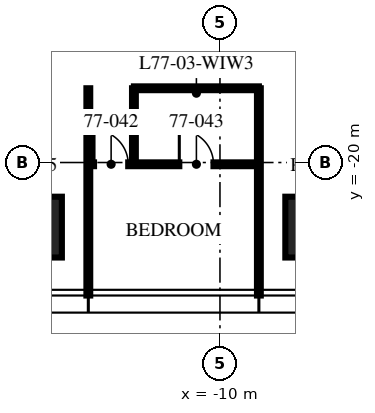
"""IFC4 building model, lengths in metres.
Left out: names, types, materials, properties, quantities, classifications, styles, units other than length and angle.
Written with IfcOpenShell. Run it as: python <this file> out.ifc"""

import sys

from ifc_helpers import new_model, si_unit, direction, frame, frame_2d, origin, origin_2d, place, context, subcontext, project, spatial, rectangle, extrude, element, fill, save


model = new_model("IFC4")
c1 = context("Model", 3, precision=1e-05, world=origin(), true_north=direction((0.0, 1.0)))
c2 = subcontext(c1, "Body", "Model", "MODEL_VIEW")
j1 = project(units=[si_unit("LENGTHUNIT", "METRE"), si_unit("PLANEANGLEUNIT", "RADIAN")], contexts=[c1])
p1 = place(None, origin())
s1 = spatial("IfcSite", under=j1, at=p1, CompositionType="ELEMENT")
p2 = place(p1, origin())
s2 = spatial("IfcBuilding", under=s1, at=p2, CompositionType="ELEMENT")
p3 = place(p2, frame((0.0, 0.0, 308.25)))
s3 = spatial("IfcBuildingStorey", under=s2, at=p3, CompositionType="ELEMENT", Elevation=308.25)
for number, where, z_axis, x_axis in (
    (1, (-7.48, -21.7, 0.0), (0.0, 0.0, 1.0), (1.0, 0.0, 0.0)),
    (2, (-14.96, -21.7, 0.0), (0.0, 0.0, 1.0), (1.0, 0.0, 0.0)),
):
    element("IfcColumn", number, at=place(p3, frame(where, z_axis=z_axis, x_axis=x_axis)), inside=s3, PredefinedType="COLUMN", context=c2, shape_type="SweptSolid", body=[
        extrude(rectangle(XDim=1.6, YDim=1.6, at=origin_2d()), origin(), (0.0, 0.0, 1.0), 3.75),
    ])
for number, where, z_axis, x_axis in (
    (3, (-13.464, -18.046, 0.0), (0.0, 0.0, 1.0), (0.0, -1.0, 0.0)),
    (4, (-8.976, -18.046, 0.0), (0.0, 0.0, 1.0), (0.0, -1.0, 0.0)),
):
    element("IfcWall", number, at=place(p3, frame(where, z_axis=z_axis, x_axis=x_axis)), inside=s3, PredefinedType="PARTITIONING", context=c2, shape_type="SweptSolid", body=[
        extrude(rectangle(XDim=5.454, YDim=0.1, at=frame_2d((2.727, 0.0))), origin(), (0.0, 0.0, 1.0), 3.01),
    ])
p4 = place(p3, frame((-13.464, -20.046, 0.0), z_axis=(0.0, 0.0, 1.0), x_axis=(1.0, 0.0, 0.0)))
e5 = element("IfcWall", 5, at=p4, inside=s3, PredefinedType="PARTITIONING", context=c2, shape_type="SweptSolid", body=[
    extrude(rectangle(XDim=4.488, YDim=0.1, at=frame_2d((2.244, 0.0))), origin(), (0.0, 0.0, 1.0), 2.91),
])
p5 = place(p4, frame((0.15, 0.0, 0.0)))
e6 = element("IfcOpeningElement", 6, at=p5, cuts=e5, PredefinedType="OPENING", context=c2, shape_type="SweptSolid", body=[
    extrude(rectangle(XDim=0.9, YDim=2.1, at=frame_2d((0.45, 1.05))), frame((0.0, 0.06, 0.0), z_axis=(0.0, -1.0, 0.0), x_axis=(1.0, 0.0, 0.0)), (0.0, 0.0, 1.0), 0.12),
])
p6 = place(p4, frame((2.394, 0.0, 0.0)))
e7 = element("IfcOpeningElement", 7, at=p6, cuts=e5, PredefinedType="OPENING", context=c2, shape_type="SweptSolid", body=[
    extrude(rectangle(XDim=0.9, YDim=2.1, at=frame_2d((0.45, 1.05))), frame((0.0, 0.06, 0.0), z_axis=(0.0, -1.0, 0.0), x_axis=(1.0, 0.0, 0.0)), (0.0, 0.0, 1.0), 0.12),
])
p7 = place(p3, frame((-12.264, -18.046, 0.0), z_axis=(0.0, 0.0, 1.0), x_axis=(0.0, -1.0, 0.0)))
e8 = element("IfcWall", 8, at=p7, inside=s3, PredefinedType="PARTITIONING", context=c2, shape_type="SweptSolid", body=[
    extrude(rectangle(XDim=2.0, YDim=0.1, at=frame_2d((1.0, 0.0))), origin(), (0.0, 0.0, 1.0), 3.5),
])
p8 = place(p3, frame((-12.264, -18.046, 0.0), z_axis=(0.0, 0.0, 1.0), x_axis=(1.0, 0.0, 0.0)))
e9 = element("IfcWall", 9, at=p8, inside=s3, PredefinedType="PARTITIONING", context=c2, shape_type="SweptSolid", body=[
    extrude(rectangle(XDim=3.288, YDim=0.1, at=frame_2d((1.644, 0.0))), origin(), (0.0, 0.0, 1.0), 2.91),
])
p9 = place(p5, origin())
e10 = element("IfcDoor", 10, at=p9, inside=s3, OperationType="SINGLE_SWING_LEFT", PredefinedType="DOOR", context=c2, shape_type="SweptSolid", body=[
    extrude(rectangle(XDim=0.9, YDim=2.1, at=frame_2d((0.45, 1.05))), frame((0.0, 0.025, 0.0), z_axis=(0.0, -1.0, 0.0), x_axis=(1.0, 0.0, 0.0)), (0.0, 0.0, 1.0), 0.05),
])
fill(e6, e10)
p10 = place(p6, origin())
e11 = element("IfcDoor", 11, at=p10, inside=s3, OperationType="SINGLE_SWING_LEFT", PredefinedType="DOOR", context=c2, shape_type="SweptSolid", body=[
    extrude(rectangle(XDim=0.9, YDim=2.1, at=frame_2d((0.45, 1.05))), frame((0.0, 0.025, 0.0), z_axis=(0.0, -1.0, 0.0), x_axis=(1.0, 0.0, 0.0)), (0.0, 0.0, 1.0), 0.05),
])
fill(e7, e11)
save(model, sys.argv[1])
